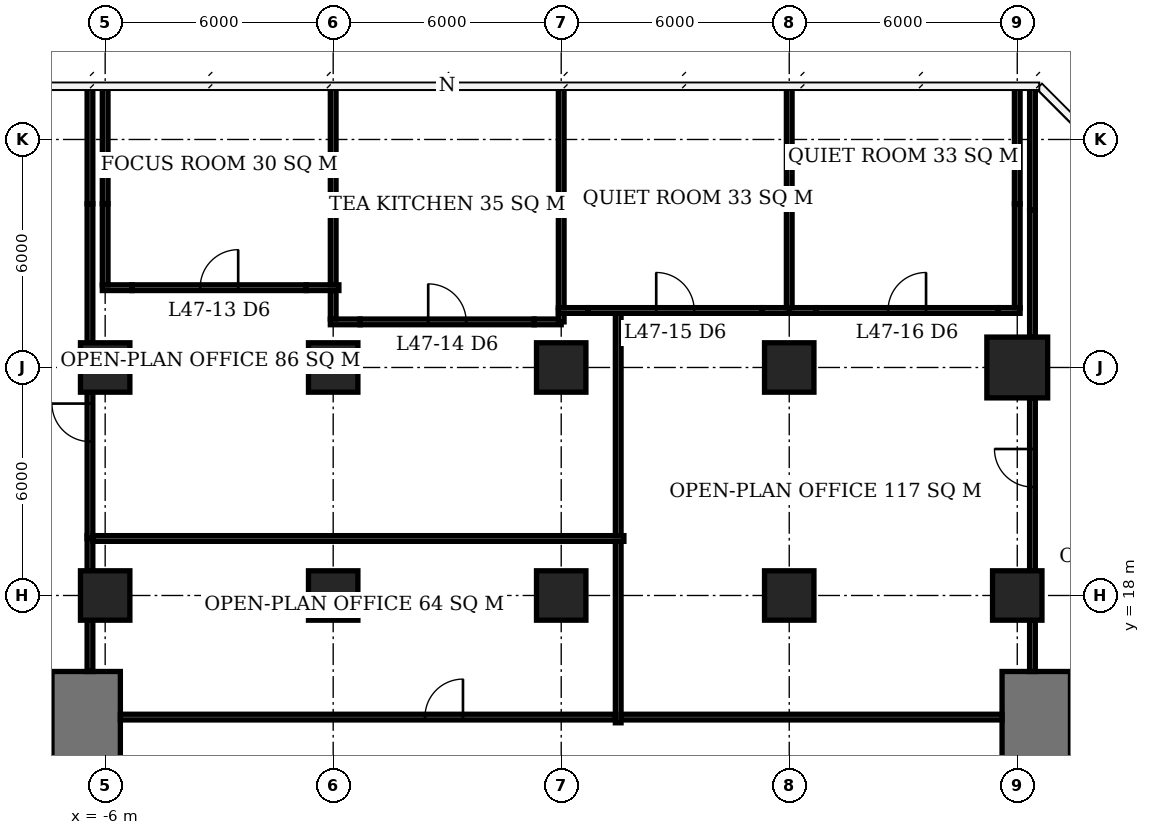
"""IFC4 building model, lengths in metres.
Left out: names, types, materials, properties, quantities, classifications, styles, units other than length and angle.
Written with IfcOpenShell. Run it as: python <this file> out.ifc"""

import sys

from ifc_helpers import new_model, si_unit, direction, frame, frame_2d, origin, origin_2d, place, context, subcontext, project, spatial, rectangle, extrude, element, fill, save


model = new_model("IFC4")
c1 = context("Model", 3, precision=1e-05, world=origin(), true_north=direction((0.0, 1.0)))
c2 = subcontext(c1, "Body", "Model", "MODEL_VIEW")
j1 = project(units=[si_unit("LENGTHUNIT", "METRE"), si_unit("PLANEANGLEUNIT", "RADIAN")], contexts=[c1])
p1 = place(None, origin())
s1 = spatial("IfcSite", under=j1, at=p1, CompositionType="ELEMENT")
p2 = place(p1, origin())
s2 = spatial("IfcBuilding", under=s1, at=p2, CompositionType="ELEMENT")
p3 = place(p2, frame((0.0, 0.0, 192.8)))
s3 = spatial("IfcBuildingStorey", under=s2, at=p3, CompositionType="ELEMENT", Elevation=192.8)
for number, where, z_axis, x_axis in (
    (1, (-6.0, 18.0, 0.0), (0.0, 0.0, 1.0), (1.0, 0.0, 0.0)),
    (2, (-6.0, 24.0, 0.0), (0.0, 0.0, 1.0), (1.0, 0.0, 0.0)),
    (3, (0.0, 18.0, 0.0), (0.0, 0.0, 1.0), (1.0, 0.0, 0.0)),
    (4, (0.0, 24.0, 0.0), (0.0, 0.0, 1.0), (1.0, 0.0, 0.0)),
    (5, (6.0, 18.0, 0.0), (0.0, 0.0, 1.0), (1.0, 0.0, 0.0)),
    (6, (6.0, 24.0, 0.0), (0.0, 0.0, 1.0), (1.0, 0.0, 0.0)),
    (7, (12.0, 18.0, 0.0), (0.0, 0.0, 1.0), (1.0, 0.0, 0.0)),
    (8, (12.0, 24.0, 0.0), (0.0, 0.0, 1.0), (1.0, 0.0, 0.0)),
    (9, (18.0, 18.0, 0.0), (0.0, 0.0, 1.0), (1.0, 0.0, 0.0)),
):
    element("IfcColumn", number, at=place(p3, frame(where, z_axis=z_axis, x_axis=x_axis)), inside=s3, PredefinedType="COLUMN", context=c2, shape_type="SweptSolid", body=[
        extrude(rectangle(XDim=1.3, YDim=1.3, at=origin_2d()), origin(), (0.0, 0.0, 1.0), 3.9),
    ])
p4 = place(p3, frame((18.0, 24.0, 0.0), z_axis=(0.0, 0.0, 1.0), x_axis=(1.0, 0.0, 0.0)))
e10 = element("IfcColumn", 10, at=p4, inside=s3, PredefinedType="COLUMN", context=c2, shape_type="SweptSolid", body=[
    extrude(rectangle(XDim=1.6, YDim=1.6, at=origin_2d()), origin(), (0.0, 0.0, 1.0), 3.9),
])
for number, where, z_axis, x_axis in (
    (11, (-6.5, 13.6, 0.0), (0.0, 0.0, 1.0), (0.0, 1.0, 0.0)),
    (12, (18.5, 13.6, 0.0), (0.0, 0.0, 1.0), (0.0, 1.0, 0.0)),
):
    element("IfcWall", number, at=place(p3, frame(where, z_axis=z_axis, x_axis=x_axis)), inside=s3, PredefinedType="SHEAR", context=c2, shape_type="SweptSolid", body=[
        extrude(rectangle(XDim=2.4, YDim=1.8, at=frame_2d((1.2, 0.0))), origin(), (0.0, 0.0, 1.0), 3.9),
    ])
p5 = place(p3, frame((-0.075, 25.2, 0.0), z_axis=(0.0, 0.0, 1.0), x_axis=(1.0, 0.0, 0.0)))
e13 = element("IfcWall", 13, at=p5, inside=s3, PredefinedType="PARTITIONING", context=c2, shape_type="SweptSolid", body=[
    extrude(rectangle(XDim=0.785, YDim=0.15, at=frame_2d((0.393, 0.0))), origin(), (0.0, 0.0, 1.0), 2.65),
])
p6 = place(p3, frame((0.71, 25.2, 0.0), z_axis=(0.0, 0.0, 1.0), x_axis=(1.0, 0.0, 0.0)))
e14 = element("IfcWall", 14, at=p6, inside=s3, PredefinedType="PARTITIONING", context=c2, shape_type="SweptSolid", body=[
    extrude(rectangle(XDim=4.58, YDim=0.15, at=frame_2d((2.29, 0.0))), origin(), (0.0, 0.0, 1.0), 3.65),
])
p7 = place(p6, frame((1.79, 0.0, 0.0)))
e15 = element("IfcOpeningElement", 15, at=p7, cuts=e14, PredefinedType="OPENING", context=c2, shape_type="SweptSolid", body=[
    extrude(rectangle(XDim=1.0, YDim=2.1, at=frame_2d((0.5, 1.05))), frame((0.0, 0.085, 0.0), z_axis=(0.0, -1.0, 0.0), x_axis=(1.0, 0.0, 0.0)), (0.0, 0.0, 1.0), 0.17),
])
p8 = place(p3, frame((5.29, 25.2, 0.0), z_axis=(0.0, 0.0, 1.0), x_axis=(1.0, 0.0, 0.0)))
e16 = element("IfcWall", 16, at=p8, inside=s3, PredefinedType="PARTITIONING", context=c2, shape_type="SweptSolid", body=[
    extrude(rectangle(XDim=0.71, YDim=0.15, at=frame_2d((0.355, 0.0))), origin(), (0.0, 0.0, 1.0), 2.65),
])
p9 = place(p3, frame((5.925, 25.5, 0.0), z_axis=(0.0, 0.0, 1.0), x_axis=(1.0, 0.0, 0.0)))
e17 = element("IfcWall", 17, at=p9, inside=s3, PredefinedType="PARTITIONING", context=c2, shape_type="SweptSolid", body=[
    extrude(rectangle(XDim=0.785, YDim=0.15, at=frame_2d((0.393, 0.0))), origin(), (0.0, 0.0, 1.0), 2.65),
])
p10 = place(p3, frame((6.71, 25.5, 0.0), z_axis=(0.0, 0.0, 1.0), x_axis=(1.0, 0.0, 0.0)))
e18 = element("IfcWall", 18, at=p10, inside=s3, PredefinedType="PARTITIONING", context=c2, shape_type="SweptSolid", body=[
    extrude(rectangle(XDim=4.58, YDim=0.15, at=frame_2d((2.29, 0.0))), origin(), (0.0, 0.0, 1.0), 3.65),
])
p11 = place(p10, frame((1.79, 0.0, 0.0)))
e19 = element("IfcOpeningElement", 19, at=p11, cuts=e18, PredefinedType="OPENING", context=c2, shape_type="SweptSolid", body=[
    extrude(rectangle(XDim=1.0, YDim=2.1, at=frame_2d((0.5, 1.05))), frame((0.0, 0.085, 0.0), z_axis=(0.0, -1.0, 0.0), x_axis=(1.0, 0.0, 0.0)), (0.0, 0.0, 1.0), 0.17),
])
p12 = place(p3, frame((11.29, 25.5, 0.0), z_axis=(0.0, 0.0, 1.0), x_axis=(1.0, 0.0, 0.0)))
e20 = element("IfcWall", 20, at=p12, inside=s3, PredefinedType="PARTITIONING", context=c2, shape_type="SweptSolid", body=[
    extrude(rectangle(XDim=0.785, YDim=0.15, at=frame_2d((0.393, 0.0))), origin(), (0.0, 0.0, 1.0), 2.65),
])
p13 = place(p3, frame((12.0, 25.5, 0.0), z_axis=(0.0, 0.0, 1.0), x_axis=(1.0, 0.0, 0.0)))
e21 = element("IfcWall", 21, at=p13, inside=s3, PredefinedType="PARTITIONING", context=c2, shape_type="SweptSolid", body=[
    extrude(rectangle(XDim=0.71, YDim=0.15, at=frame_2d((0.355, 0.0))), origin(), (0.0, 0.0, 1.0), 2.65),
])
p14 = place(p3, frame((12.71, 25.5, 0.0), z_axis=(0.0, 0.0, 1.0), x_axis=(1.0, 0.0, 0.0)))
e22 = element("IfcWall", 22, at=p14, inside=s3, PredefinedType="PARTITIONING", context=c2, shape_type="SweptSolid", body=[
    extrude(rectangle(XDim=4.78, YDim=0.15, at=frame_2d((2.39, 0.0))), origin(), (0.0, 0.0, 1.0), 3.65),
])
p15 = place(p14, frame((1.89, 0.0, 0.0)))
e23 = element("IfcOpeningElement", 23, at=p15, cuts=e22, PredefinedType="OPENING", context=c2, shape_type="SweptSolid", body=[
    extrude(rectangle(XDim=1.0, YDim=2.1, at=frame_2d((0.5, 1.05))), frame((0.0, 0.085, 0.0), z_axis=(0.0, -1.0, 0.0), x_axis=(1.0, 0.0, 0.0)), (0.0, 0.0, 1.0), 0.17),
])
p16 = place(p3, frame((17.49, 25.5, 0.0), z_axis=(0.0, 0.0, 1.0), x_axis=(1.0, 0.0, 0.0)))
e24 = element("IfcWall", 24, at=p16, inside=s3, PredefinedType="PARTITIONING", context=c2, shape_type="SweptSolid", body=[
    extrude(rectangle(XDim=0.585, YDim=0.15, at=frame_2d((0.292, 0.0))), origin(), (0.0, 0.0, 1.0), 2.65),
])
p17 = place(p3, frame((-6.075, 26.1, 0.0), z_axis=(0.0, 0.0, 1.0), x_axis=(1.0, 0.0, 0.0)))
e25 = element("IfcWall", 25, at=p17, inside=s3, PredefinedType="PARTITIONING", context=c2, shape_type="SweptSolid", body=[
    extrude(rectangle(XDim=0.785, YDim=0.15, at=frame_2d((0.393, 0.0))), origin(), (0.0, 0.0, 1.0), 2.65),
])
p18 = place(p3, frame((-5.29, 26.1, 0.0), z_axis=(0.0, 0.0, 1.0), x_axis=(1.0, 0.0, 0.0)))
e26 = element("IfcWall", 26, at=p18, inside=s3, PredefinedType="PARTITIONING", context=c2, shape_type="SweptSolid", body=[
    extrude(rectangle(XDim=4.58, YDim=0.15, at=frame_2d((2.29, 0.0))), origin(), (0.0, 0.0, 1.0), 3.65),
])
p19 = place(p18, frame((1.79, 0.0, 0.0)))
e27 = element("IfcOpeningElement", 27, at=p19, cuts=e26, PredefinedType="OPENING", context=c2, shape_type="SweptSolid", body=[
    extrude(rectangle(XDim=1.0, YDim=2.1, at=frame_2d((0.5, 1.05))), frame((0.0, 0.085, 0.0), z_axis=(0.0, -1.0, 0.0), x_axis=(1.0, 0.0, 0.0)), (0.0, 0.0, 1.0), 0.17),
])
p20 = place(p3, frame((-0.71, 26.1, 0.0), z_axis=(0.0, 0.0, 1.0), x_axis=(1.0, 0.0, 0.0)))
e28 = element("IfcWall", 28, at=p20, inside=s3, PredefinedType="PARTITIONING", context=c2, shape_type="SweptSolid", body=[
    extrude(rectangle(XDim=0.86, YDim=0.15, at=frame_2d((0.43, 0.0))), origin(), (0.0, 0.0, 1.0), 2.65),
])
p21 = place(p3, frame((-6.0, 26.175, 0.0), z_axis=(0.0, 0.0, 1.0), x_axis=(0.0, 1.0, 0.0)))
e29 = element("IfcWall", 29, at=p21, inside=s3, PredefinedType="PARTITIONING", context=c2, shape_type="SweptSolid", body=[
    extrude(rectangle(XDim=2.135, YDim=0.15, at=frame_2d((1.067, 0.0))), origin(), (0.0, 0.0, 1.0), 2.65),
])
p22 = place(p3, frame((-6.0, 28.31, 0.0), z_axis=(0.0, 0.0, 1.0), x_axis=(0.0, 1.0, 0.0)))
e30 = element("IfcWall", 30, at=p22, inside=s3, PredefinedType="PARTITIONING", context=c2, shape_type="SweptSolid", body=[
    extrude(rectangle(XDim=3.09, YDim=0.15, at=frame_2d((1.545, 0.0))), origin(), (0.0, 0.0, 1.0), 3.65),
])
p23 = place(p3, frame((0.0, 25.275, 0.0), z_axis=(0.0, 0.0, 1.0), x_axis=(0.0, 1.0, 0.0)))
e31 = element("IfcWall", 31, at=p23, inside=s3, PredefinedType="PARTITIONING", context=c2, shape_type="SweptSolid", body=[
    extrude(rectangle(XDim=0.75, YDim=0.15, at=frame_2d((0.375, 0.0))), origin(), (0.0, 0.0, 1.0), 2.65),
])
p24 = place(p3, frame((0.0, 26.175, 0.0), z_axis=(0.0, 0.0, 1.0), x_axis=(0.0, 1.0, 0.0)))
e32 = element("IfcWall", 32, at=p24, inside=s3, PredefinedType="PARTITIONING", context=c2, shape_type="SweptSolid", body=[
    extrude(rectangle(XDim=2.135, YDim=0.15, at=frame_2d((1.067, 0.0))), origin(), (0.0, 0.0, 1.0), 2.65),
])
p25 = place(p3, frame((0.0, 28.31, 0.0), z_axis=(0.0, 0.0, 1.0), x_axis=(0.0, 1.0, 0.0)))
e33 = element("IfcWall", 33, at=p25, inside=s3, PredefinedType="PARTITIONING", context=c2, shape_type="SweptSolid", body=[
    extrude(rectangle(XDim=3.04, YDim=0.15, at=frame_2d((1.52, 0.0))), origin(), (0.0, 0.0, 1.0), 3.65),
])
p26 = place(p3, frame((6.0, 25.2, 0.0), z_axis=(0.0, 0.0, 1.0), x_axis=(0.0, 1.0, 0.0)))
e34 = element("IfcWall", 34, at=p26, inside=s3, PredefinedType="PARTITIONING", context=c2, shape_type="SweptSolid", body=[
    extrude(rectangle(XDim=0.3, YDim=0.15, at=frame_2d((0.15, 0.0))), origin(), (0.0, 0.0, 1.0), 2.65),
])
p27 = place(p3, frame((6.0, 25.575, 0.0), z_axis=(0.0, 0.0, 1.0), x_axis=(0.0, 1.0, 0.0)))
e35 = element("IfcWall", 35, at=p27, inside=s3, PredefinedType="PARTITIONING", context=c2, shape_type="SweptSolid", body=[
    extrude(rectangle(XDim=2.735, YDim=0.15, at=frame_2d((1.368, 0.0))), origin(), (0.0, 0.0, 1.0), 2.65),
])
p28 = place(p3, frame((6.0, 28.31, 0.0), z_axis=(0.0, 0.0, 1.0), x_axis=(0.0, 1.0, 0.0)))
e36 = element("IfcWall", 36, at=p28, inside=s3, PredefinedType="PARTITIONING", context=c2, shape_type="SweptSolid", body=[
    extrude(rectangle(XDim=3.04, YDim=0.15, at=frame_2d((1.52, 0.0))), origin(), (0.0, 0.0, 1.0), 3.65),
])
p29 = place(p3, frame((12.0, 25.575, 0.0), z_axis=(0.0, 0.0, 1.0), x_axis=(0.0, 1.0, 0.0)))
e37 = element("IfcWall", 37, at=p29, inside=s3, PredefinedType="PARTITIONING", context=c2, shape_type="SweptSolid", body=[
    extrude(rectangle(XDim=2.735, YDim=0.15, at=frame_2d((1.368, 0.0))), origin(), (0.0, 0.0, 1.0), 2.65),
])
p30 = place(p3, frame((12.0, 28.31, 0.0), z_axis=(0.0, 0.0, 1.0), x_axis=(0.0, 1.0, 0.0)))
e38 = element("IfcWall", 38, at=p30, inside=s3, PredefinedType="PARTITIONING", context=c2, shape_type="SweptSolid", body=[
    extrude(rectangle(XDim=3.09, YDim=0.15, at=frame_2d((1.545, 0.0))), origin(), (0.0, 0.0, 1.0), 3.65),
])
p31 = place(p3, frame((18.0, 25.575, 0.0), z_axis=(0.0, 0.0, 1.0), x_axis=(0.0, 1.0, 0.0)))
e39 = element("IfcWall", 39, at=p31, inside=s3, PredefinedType="PARTITIONING", context=c2, shape_type="SweptSolid", body=[
    extrude(rectangle(XDim=2.735, YDim=0.15, at=frame_2d((1.368, 0.0))), origin(), (0.0, 0.0, 1.0), 2.65),
])
p32 = place(p3, frame((18.0, 28.31, 0.0), z_axis=(0.0, 0.0, 1.0), x_axis=(0.0, 1.0, 0.0)))
e40 = element("IfcWall", 40, at=p32, inside=s3, PredefinedType="PARTITIONING", context=c2, shape_type="SweptSolid", body=[
    extrude(rectangle(XDim=3.09, YDim=0.15, at=frame_2d((1.545, 0.0))), origin(), (0.0, 0.0, 1.0), 3.65),
])
p33 = place(p3, frame((-6.4, 16.0, 0.0), z_axis=(0.0, 0.0, 1.0), x_axis=(0.0, 1.0, 0.0)))
e41 = element("IfcWall", 41, at=p33, inside=s3, PredefinedType="PARTITIONING", context=c2, shape_type="SweptSolid", body=[
    extrude(rectangle(XDim=1.35, YDim=0.15, at=frame_2d((0.675, 0.0))), origin(), (0.0, 0.0, 1.0), 3.65),
])
p34 = place(p3, frame((-6.4, 18.65, 0.0), z_axis=(0.0, 0.0, 1.0), x_axis=(0.0, 1.0, 0.0)))
e42 = element("IfcWall", 42, at=p34, inside=s3, PredefinedType="PARTITIONING", context=c2, shape_type="SweptSolid", body=[
    extrude(rectangle(XDim=0.925, YDim=0.15, at=frame_2d((0.462, 0.0))), origin(), (0.0, 0.0, 1.0), 3.65),
])
p35 = place(p3, frame((-6.4, 19.5, 0.0), z_axis=(0.0, 0.0, 1.0), x_axis=(0.0, 1.0, 0.0)))
e43 = element("IfcWall", 43, at=p35, inside=s3, PredefinedType="PARTITIONING", context=c2, shape_type="SweptSolid", body=[
    extrude(rectangle(XDim=3.85, YDim=0.15, at=frame_2d((1.925, 0.0))), origin(), (0.0, 0.0, 1.0), 3.65),
])
p36 = place(p35, frame((2.55, 0.0, 0.0)))
e44 = element("IfcOpeningElement", 44, at=p36, cuts=e43, PredefinedType="OPENING", context=c2, shape_type="SweptSolid", body=[
    extrude(rectangle(XDim=1.0, YDim=2.1, at=frame_2d((0.5, 1.05))), frame((0.0, 0.085, 0.0), z_axis=(0.0, -1.0, 0.0), x_axis=(1.0, 0.0, 0.0)), (0.0, 0.0, 1.0), 0.17),
])
p37 = place(p3, frame((-6.4, 24.65, 0.0), z_axis=(0.0, 0.0, 1.0), x_axis=(0.0, 1.0, 0.0)))
e45 = element("IfcWall", 45, at=p37, inside=s3, PredefinedType="PARTITIONING", context=c2, shape_type="SweptSolid", body=[
    extrude(rectangle(XDim=3.66, YDim=0.15, at=frame_2d((1.83, 0.0))), origin(), (0.0, 0.0, 1.0), 2.65),
])
p38 = place(p3, frame((-6.4, 28.31, 0.0), z_axis=(0.0, 0.0, 1.0), x_axis=(0.0, 1.0, 0.0)))
e46 = element("IfcWall", 46, at=p38, inside=s3, PredefinedType="PARTITIONING", context=c2, shape_type="SweptSolid", body=[
    extrude(rectangle(XDim=3.04, YDim=0.15, at=frame_2d((1.52, 0.0))), origin(), (0.0, 0.0, 1.0), 3.65),
])
p39 = place(p3, frame((-6.325, 19.5, 0.0), z_axis=(0.0, 0.0, 1.0), x_axis=(1.0, 0.0, 0.0)))
e47 = element("IfcWall", 47, at=p39, inside=s3, PredefinedType="PARTITIONING", context=c2, shape_type="SweptSolid", body=[
    extrude(rectangle(XDim=13.975, YDim=0.15, at=frame_2d((6.987, 0.0))), origin(), (0.0, 0.0, 1.0), 3.65),
])
p40 = place(p3, frame((-5.6, 14.8, 0.0), z_axis=(0.0, 0.0, 1.0), x_axis=(1.0, 0.0, 0.0)))
e48 = element("IfcWall", 48, at=p40, inside=s3, PredefinedType="PARTITIONING", context=c2, shape_type="SweptSolid", body=[
    extrude(rectangle(XDim=13.025, YDim=0.15, at=frame_2d((6.513, 0.0))), origin(), (0.0, 0.0, 1.0), 3.65),
])
p41 = place(p40, frame((8.015, 0.0, 0.0)))
e49 = element("IfcOpeningElement", 49, at=p41, cuts=e48, PredefinedType="OPENING", context=c2, shape_type="SweptSolid", body=[
    extrude(rectangle(XDim=1.0, YDim=2.1, at=frame_2d((0.5, 1.05))), frame((0.0, 0.085, 0.0), z_axis=(0.0, -1.0, 0.0), x_axis=(1.0, 0.0, 0.0)), (0.0, 0.0, 1.0), 0.17),
])
p42 = place(p3, frame((7.5, 14.65, 0.0), z_axis=(0.0, 0.0, 1.0), x_axis=(0.0, 1.0, 0.0)))
e50 = element("IfcWall", 50, at=p42, inside=s3, PredefinedType="PARTITIONING", context=c2, shape_type="SweptSolid", body=[
    extrude(rectangle(XDim=4.775, YDim=0.15, at=frame_2d((2.388, 0.0))), origin(), (0.0, 0.0, 1.0), 3.65),
])
p43 = place(p3, frame((7.575, 14.8, 0.0), z_axis=(0.0, 0.0, 1.0), x_axis=(1.0, 0.0, 0.0)))
e51 = element("IfcWall", 51, at=p43, inside=s3, PredefinedType="PARTITIONING", context=c2, shape_type="SweptSolid", body=[
    extrude(rectangle(XDim=10.025, YDim=0.15, at=frame_2d((5.013, 0.0))), origin(), (0.0, 0.0, 1.0), 3.65),
])
p44 = place(p3, frame((7.5, 19.575, 0.0), z_axis=(0.0, 0.0, 1.0), x_axis=(0.0, 1.0, 0.0)))
e52 = element("IfcWall", 52, at=p44, inside=s3, PredefinedType="PARTITIONING", context=c2, shape_type="SweptSolid", body=[
    extrude(rectangle(XDim=5.85, YDim=0.15, at=frame_2d((2.925, 0.0))), origin(), (0.0, 0.0, 1.0), 3.65),
])
p45 = place(p3, frame((18.4, 16.0, 0.0), z_axis=(0.0, 0.0, 1.0), x_axis=(0.0, 1.0, 0.0)))
e53 = element("IfcWall", 53, at=p45, inside=s3, PredefinedType="PARTITIONING", context=c2, shape_type="SweptSolid", body=[
    extrude(rectangle(XDim=1.35, YDim=0.15, at=frame_2d((0.675, 0.0))), origin(), (0.0, 0.0, 1.0), 3.65),
])
p46 = place(p3, frame((18.4, 18.65, 0.0), z_axis=(0.0, 0.0, 1.0), x_axis=(0.0, 1.0, 0.0)))
e54 = element("IfcWall", 54, at=p46, inside=s3, PredefinedType="PARTITIONING", context=c2, shape_type="SweptSolid", body=[
    extrude(rectangle(XDim=4.55, YDim=0.15, at=frame_2d((2.275, 0.0))), origin(), (0.0, 0.0, 1.0), 3.65),
])
p47 = place(p46, frame((2.205, 0.0, 0.0)))
e55 = element("IfcOpeningElement", 55, at=p47, cuts=e54, PredefinedType="OPENING", context=c2, shape_type="SweptSolid", body=[
    extrude(rectangle(XDim=1.0, YDim=2.1, at=frame_2d((0.5, 1.05))), frame((0.0, 0.085, 0.0), z_axis=(0.0, -1.0, 0.0), x_axis=(1.0, 0.0, 0.0)), (0.0, 0.0, 1.0), 0.17),
])
p48 = place(p3, frame((18.4, 24.8, 0.0), z_axis=(0.0, 0.0, 1.0), x_axis=(0.0, 1.0, 0.0)))
e56 = element("IfcWall", 56, at=p48, inside=s3, PredefinedType="PARTITIONING", context=c2, shape_type="SweptSolid", body=[
    extrude(rectangle(XDim=3.34, YDim=0.15, at=frame_2d((1.67, 0.0))), origin(), (0.0, 0.0, 1.0), 2.65),
])
p49 = place(p3, frame((18.4, 28.14, 0.0), z_axis=(0.0, 0.0, 1.0), x_axis=(0.0, 1.0, 0.0)))
e57 = element("IfcWall", 57, at=p49, inside=s3, PredefinedType="PARTITIONING", context=c2, shape_type="SweptSolid", body=[
    extrude(rectangle(XDim=3.26, YDim=0.15, at=frame_2d((1.63, 0.0))), origin(), (0.0, 0.0, 1.0), 3.65),
])
p50 = place(p19, origin())
e58 = element("IfcDoor", 58, at=p50, inside=s3, OperationType="SINGLE_SWING_RIGHT", PredefinedType="DOOR", context=c2, shape_type="SweptSolid", body=[
    extrude(rectangle(XDim=1.0, YDim=2.1, at=frame_2d((0.5, 1.05))), frame((0.0, 0.025, 0.0), z_axis=(0.0, -1.0, 0.0), x_axis=(1.0, 0.0, 0.0)), (0.0, 0.0, 1.0), 0.05),
])
fill(e27, e58)
p51 = place(p7, origin())
e59 = element("IfcDoor", 59, at=p51, inside=s3, OperationType="SINGLE_SWING_LEFT", PredefinedType="DOOR", context=c2, shape_type="SweptSolid", body=[
    extrude(rectangle(XDim=1.0, YDim=2.1, at=frame_2d((0.5, 1.05))), frame((0.0, 0.025, 0.0), z_axis=(0.0, -1.0, 0.0), x_axis=(1.0, 0.0, 0.0)), (0.0, 0.0, 1.0), 0.05),
])
fill(e15, e59)
p52 = place(p11, origin())
e60 = element("IfcDoor", 60, at=p52, inside=s3, OperationType="SINGLE_SWING_LEFT", PredefinedType="DOOR", context=c2, shape_type="SweptSolid", body=[
    extrude(rectangle(XDim=1.0, YDim=2.1, at=frame_2d((0.5, 1.05))), frame((0.0, 0.025, 0.0), z_axis=(0.0, -1.0, 0.0), x_axis=(1.0, 0.0, 0.0)), (0.0, 0.0, 1.0), 0.05),
])
fill(e19, e60)
p53 = place(p15, origin())
e61 = element("IfcDoor", 61, at=p53, inside=s3, OperationType="SINGLE_SWING_RIGHT", PredefinedType="DOOR", context=c2, shape_type="SweptSolid", body=[
    extrude(rectangle(XDim=1.0, YDim=2.1, at=frame_2d((0.5, 1.05))), frame((0.0, 0.025, 0.0), z_axis=(0.0, -1.0, 0.0), x_axis=(1.0, 0.0, 0.0)), (0.0, 0.0, 1.0), 0.05),
])
fill(e23, e61)
p54 = place(p41, origin())
e62 = element("IfcDoor", 62, at=p54, inside=s3, OperationType="SINGLE_SWING_RIGHT", PredefinedType="DOOR", context=c2, shape_type="SweptSolid", body=[
    extrude(rectangle(XDim=1.0, YDim=2.1, at=frame_2d((0.5, 1.05))), frame((0.0, 0.025, 0.0), z_axis=(0.0, -1.0, 0.0), x_axis=(1.0, 0.0, 0.0)), (0.0, 0.0, 1.0), 0.05),
])
fill(e49, e62)
p55 = place(p47, origin())
e63 = element("IfcDoor", 63, at=p55, inside=s3, OperationType="SINGLE_SWING_RIGHT", PredefinedType="DOOR", context=c2, shape_type="SweptSolid", body=[
    extrude(rectangle(XDim=1.0, YDim=2.1, at=frame_2d((0.5, 1.05))), frame((0.0, 0.025, 0.0), z_axis=(0.0, -1.0, 0.0), x_axis=(1.0, 0.0, 0.0)), (0.0, 0.0, 1.0), 0.05),
])
fill(e55, e63)
p56 = place(p36, origin())
e64 = element("IfcDoor", 64, at=p56, inside=s3, OperationType="SINGLE_SWING_RIGHT", PredefinedType="DOOR", context=c2, shape_type="SweptSolid", body=[
    extrude(rectangle(XDim=1.0, YDim=2.1, at=frame_2d((0.5, 1.05))), frame((0.0, 0.025, 0.0), z_axis=(0.0, -1.0, 0.0), x_axis=(1.0, 0.0, 0.0)), (0.0, 0.0, 1.0), 0.05),
])
fill(e44, e64)
save(model, sys.argv[1])
